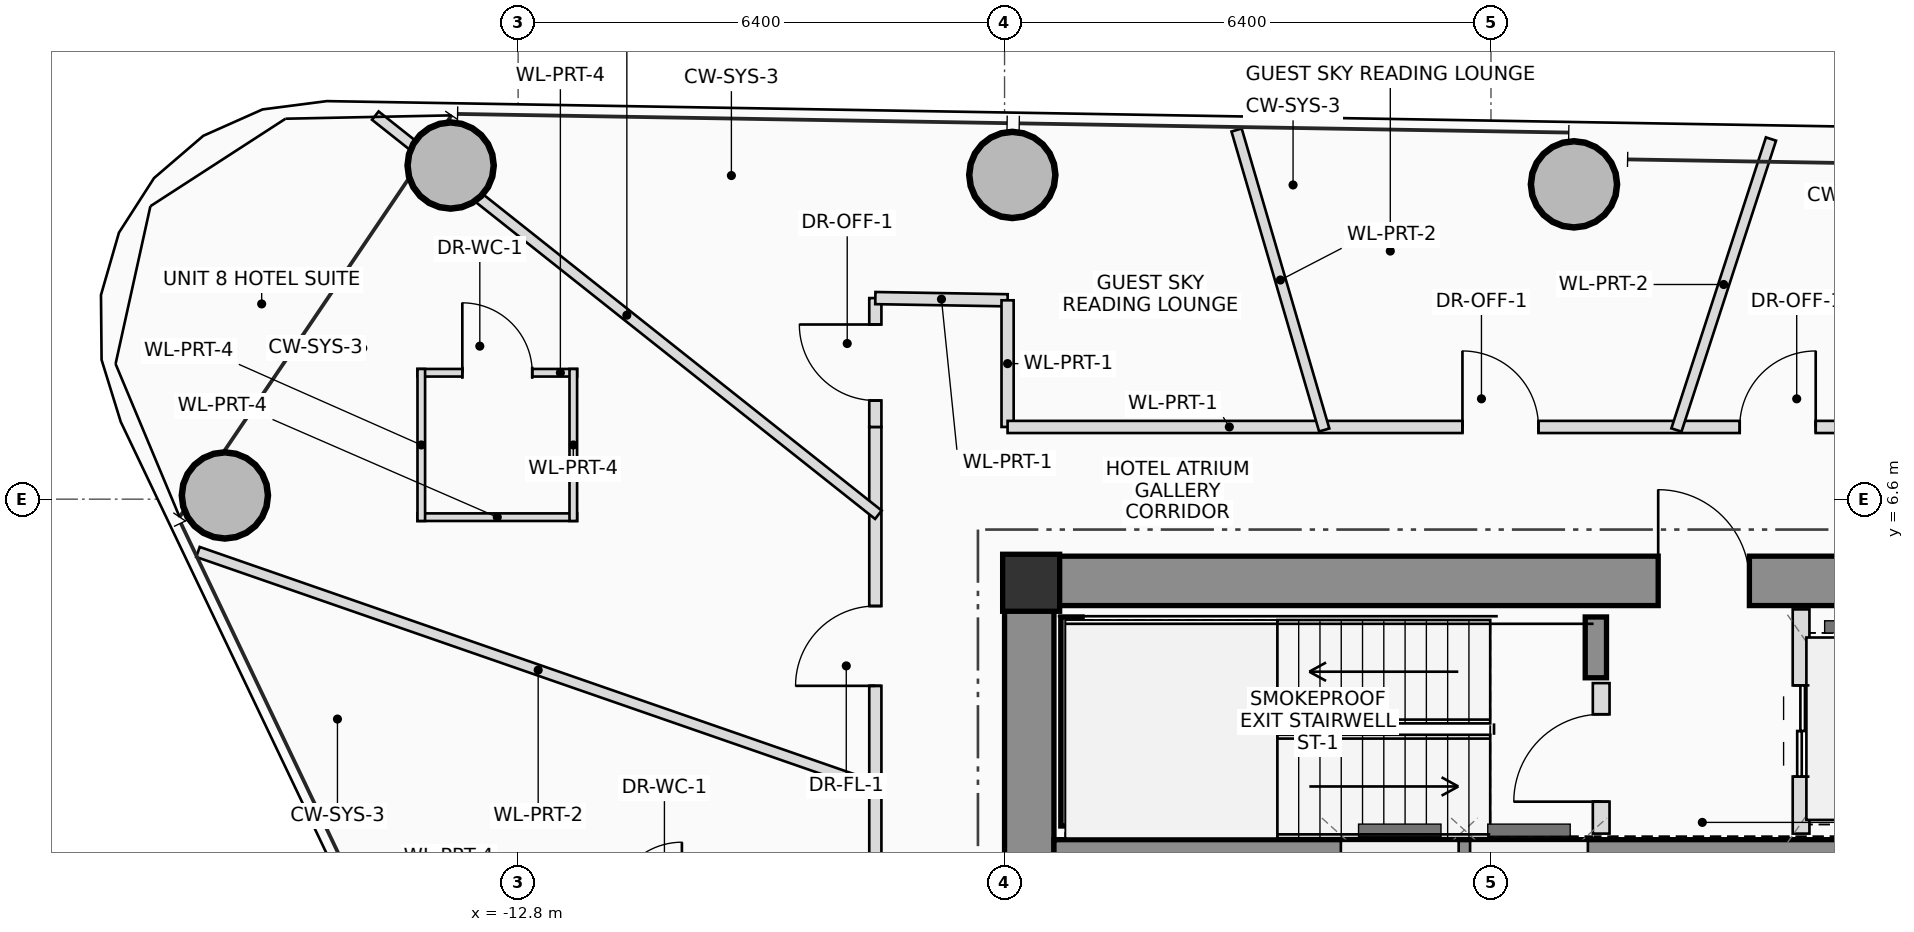
"""IFC4 building model, lengths in metres.
Left out: names, types, materials, properties, quantities, classifications, styles, units other than length and angle.
Written with IfcOpenShell. Run it as: python <this file> out.ifc"""

import sys

from ifc_helpers import new_model, si_unit, direction, frame, frame_2d, origin, origin_2d, place, context, subcontext, project, spatial, rectangle, hollow_circle, extrude, source, transform, mapped, element, fill, save


model = new_model("IFC4")
c1 = context("Model", 3, precision=1e-05, world=origin(), true_north=direction((0.0, 1.0)))
c2 = subcontext(c1, "Body", "Model", "MODEL_VIEW")
j1 = project(units=[si_unit("LENGTHUNIT", "METRE"), si_unit("PLANEANGLEUNIT", "RADIAN")], contexts=[c1])
p1 = place(None, origin())
s1 = spatial("IfcSite", under=j1, at=p1, CompositionType="ELEMENT")
p2 = place(p1, origin())
s2 = spatial("IfcBuilding", under=s1, at=p2, CompositionType="ELEMENT")
p3 = place(p2, frame((0.0, 0.0, 201.8)))
s3 = spatial("IfcBuildingStorey", under=s2, at=p3, CompositionType="ELEMENT", Elevation=201.8)
m1 = source(origin(), c2, "Body", "SweptSolid", [
    extrude(rectangle(XDim=0.75, YDim=0.75, at=origin_2d()), origin(), (0.0, 0.0, 1.0), 3.45),
])
p4 = place(p3, frame((-6.05, 5.5, 0.0), z_axis=(0.0, 0.0, 1.0), x_axis=(1.0, 0.0, 0.0)))
e1 = element("IfcColumn", 1, at=p4, inside=s3, PredefinedType="COLUMN", context=c2, shape_type="MappedRepresentation", body=[
    mapped(m1, transform((0.0, 0.0, 0.0), scale=1.0)),
])
p5 = place(p3, frame((-6.4, 5.525, 0.0), z_axis=(0.0, 0.0, 1.0), x_axis=(1.0, 0.0, 0.0)))
e2 = element("IfcWall", 2, at=p5, inside=s3, PredefinedType="SHEAR", context=c2, shape_type="SweptSolid", body=[
    extrude(rectangle(XDim=12.8, YDim=0.65, at=frame_2d((6.4, 0.0))), origin(), (0.0, 0.0, 1.0), 3.45),
])
p6 = place(p5, frame((8.6, 0.0, 0.0)))
e3 = element("IfcOpeningElement", 3, at=p6, cuts=e2, PredefinedType="OPENING", context=c2, shape_type="SweptSolid", body=[
    extrude(rectangle(XDim=1.2, YDim=2.2, at=frame_2d((0.6, 1.1))), frame((0.0, 0.335, 0.0), z_axis=(0.0, -1.0, 0.0), x_axis=(1.0, 0.0, 0.0)), (0.0, 0.0, 1.0), 0.67),
])
p7 = place(p3, frame((-6.075, 1.75, 0.0), z_axis=(0.0, 0.0, 1.0), x_axis=(0.0, 1.0, 0.0)))
e4 = element("IfcWall", 4, at=p7, inside=s3, PredefinedType="SHEAR", context=c2, shape_type="SweptSolid", body=[
    extrude(rectangle(XDim=3.45, YDim=0.65, at=frame_2d((1.725, 0.0))), origin(), (0.0, 0.0, 1.0), 3.45),
])
p8 = place(p3, frame((-5.75, 1.94, 0.0), z_axis=(0.0, 0.0, 1.0), x_axis=(1.0, 0.0, 0.0)))
e5 = element("IfcWall", 5, at=p8, inside=s3, PredefinedType="SHEAR", context=c2, shape_type="SweptSolid", body=[
    extrude(rectangle(XDim=11.5, YDim=0.36, at=frame_2d((5.75, 0.0))), origin(), (0.0, 0.0, 1.0), 3.45),
])
p9 = place(p3, frame((-5.52, 2.3, 0.0), z_axis=(0.0, 0.0, 1.0), x_axis=(0.0, 1.0, 0.0)))
e6 = element("IfcWall", 6, at=p9, inside=s3, PredefinedType="SHEAR", context=c2, shape_type="SweptSolid", body=[
    extrude(rectangle(XDim=2.75, YDim=0.28, at=frame_2d((1.375, 0.0))), origin(), (0.0, 0.0, 1.0), 3.45),
])
p10 = place(p3, frame((1.38, 4.25, 0.0), z_axis=(0.0, 0.0, 1.0), x_axis=(0.0, 1.0, 0.0)))
e7 = element("IfcWall", 7, at=p10, inside=s3, PredefinedType="SHEAR", context=c2, shape_type="SweptSolid", body=[
    extrude(rectangle(XDim=0.8, YDim=0.28, at=frame_2d((0.4, 0.0))), origin(), (0.0, 0.0, 1.0), 3.45),
])
m2 = source(origin(), c2, "Body", "SweptSolid", [
    extrude(hollow_circle(Radius=0.575, WallThickness=0.042, at=origin_2d()), origin(), (0.0, 0.0, 1.0), 3.45),
])
for number, where, z_axis, x_axis in (
    (8, (1.092, 10.742, 0.0), (0.0, 0.0, 1.0), (1.0, 0.0, 0.0)),
    (9, (-6.298, 10.865, 0.0), (0.0, 0.0, 1.0), (1.0, 0.0, 0.0)),
    (10, (-13.688, 10.99, 0.0), (0.0, 0.0, 1.0), (1.0, 0.0, 0.0)),
    (11, (-16.658, 6.649, 0.0), (0.0, 0.0, 1.0), (1.0, 0.0, 0.0)),
):
    element("IfcColumn", number, at=place(p3, frame(where, z_axis=z_axis, x_axis=x_axis)), inside=s3, PredefinedType="COLUMN", context=c2, shape_type="MappedRepresentation", body=[
        mapped(m2, transform((0.0, 0.0, 0.0), scale=1.0)),
    ])
p11 = place(p3, frame((1.45, 2.2, 0.0), z_axis=(0.0, 0.0, 1.0), x_axis=(0.0, 1.0, 0.0)))
e12 = element("IfcWall", 12, at=p11, inside=s3, PredefinedType="PLUMBINGWALL", context=c2, shape_type="SweptSolid", body=[
    extrude(rectangle(XDim=1.98, YDim=0.22, at=frame_2d((0.99, 0.0))), origin(), (0.0, 0.0, 1.0), 3.25),
])
p12 = place(p11, frame((0.42, 0.0, 0.0)))
e13 = element("IfcOpeningElement", 13, at=p12, cuts=e12, PredefinedType="OPENING", context=c2, shape_type="SweptSolid", body=[
    extrude(rectangle(XDim=1.15, YDim=2.15, at=frame_2d((0.575, 1.075))), frame((0.0, 0.12, 0.0), z_axis=(0.0, -1.0, 0.0), x_axis=(1.0, 0.0, 0.0)), (0.0, 0.0, 1.0), 0.24),
])
p13 = place(p3, frame((4.08, 2.2, 0.0), z_axis=(0.0, 0.0, 1.0), x_axis=(0.0, 1.0, 0.0)))
e14 = element("IfcWall", 14, at=p13, inside=s3, PredefinedType="PLUMBINGWALL", context=c2, shape_type="SweptSolid", body=[
    extrude(rectangle(XDim=2.95, YDim=0.22, at=frame_2d((1.475, 0.0))), origin(), (0.0, 0.0, 1.0), 3.25),
])
p14 = place(p13, frame((0.75, 0.0, 0.0)))
e15 = element("IfcOpeningElement", 15, at=p14, cuts=e14, PredefinedType="OPENING", context=c2, shape_type="SweptSolid", body=[
    extrude(rectangle(XDim=1.2, YDim=2.25, at=frame_2d((0.6, 1.125))), frame((0.0, 0.12, 0.0), z_axis=(0.0, -1.0, 0.0), x_axis=(1.0, 0.0, 0.0)), (0.0, 0.0, 1.0), 0.24),
])
p15 = place(p3, frame((-14.124, 8.263, 0.0), z_axis=(0.0, 0.0, 1.0), x_axis=(1.0, 0.0, 0.0)))
e16 = element("IfcWall", 16, at=p15, inside=s3, PredefinedType="PARTITIONING", context=c2, shape_type="SweptSolid", body=[
    extrude(rectangle(XDim=2.1, YDim=0.1, at=frame_2d((1.05, 0.0))), origin(), (0.0, 0.0, 1.0), 3.25),
])
p16 = place(p15, frame((0.59, 0.0, 0.0)))
e17 = element("IfcOpeningElement", 17, at=p16, cuts=e16, PredefinedType="OPENING", context=c2, shape_type="SweptSolid", body=[
    extrude(rectangle(XDim=0.92, YDim=2.1, at=frame_2d((0.46, 1.05))), frame((0.0, 0.06, 0.0), z_axis=(0.0, -1.0, 0.0), x_axis=(1.0, 0.0, 0.0)), (0.0, 0.0, 1.0), 0.12),
])
p17 = place(p3, frame((-12.024, 6.363, 0.0), z_axis=(0.0, 0.0, 1.0), x_axis=(-1.0, 0.0, 0.0)))
e18 = element("IfcWall", 18, at=p17, inside=s3, PredefinedType="PARTITIONING", context=c2, shape_type="SweptSolid", body=[
    extrude(rectangle(XDim=2.1, YDim=0.1, at=frame_2d((1.05, 0.0))), origin(), (0.0, 0.0, 1.0), 2.605),
])
p18 = place(p3, frame((-12.074, 8.313, 0.0), z_axis=(0.0, 0.0, 1.0), x_axis=(0.0, -1.0, 0.0)))
e19 = element("IfcWall", 19, at=p18, inside=s3, PredefinedType="PARTITIONING", context=c2, shape_type="SweptSolid", body=[
    extrude(rectangle(XDim=2.0, YDim=0.1, at=frame_2d((1.0, 0.0))), origin(), (0.0, 0.0, 1.0), 2.905),
])
p19 = place(p3, frame((-14.074, 6.313, 0.0), z_axis=(0.0, 0.0, 1.0), x_axis=(0.0, 1.0, 0.0)))
e20 = element("IfcWall", 20, at=p19, inside=s3, PredefinedType="PARTITIONING", context=c2, shape_type="SweptSolid", body=[
    extrude(rectangle(XDim=2.0, YDim=0.1, at=frame_2d((1.0, 0.0))), origin(), (0.0, 0.0, 1.0), 2.605),
])
p20 = place(p3, frame((-8.1, -7.46, 0.0), z_axis=(0.0, 0.0, 1.0), x_axis=(0.0, 1.0, 0.0)))
e21 = element("IfcWall", 21, at=p20, inside=s3, PredefinedType="PARTITIONING", context=c2, shape_type="SweptSolid", body=[
    extrude(rectangle(XDim=15.01, YDim=0.16, at=frame_2d((7.505, 0.0))), origin(), (0.0, 0.0, 1.0), 2.605),
])
p21 = place(p20, frame((1.537, 0.0, 0.0)))
e22 = element("IfcOpeningElement", 22, at=p21, cuts=e21, PredefinedType="OPENING", context=c2, shape_type="SweptSolid", body=[
    extrude(rectangle(XDim=0.9, YDim=2.05, at=frame_2d((0.45, 1.025))), frame((0.0, 0.09, 0.0), z_axis=(0.0, -1.0, 0.0), x_axis=(1.0, 0.0, 0.0)), (0.0, 0.0, 1.0), 0.18),
])
p22 = place(p20, frame((6.522, 0.0, 0.0)))
e23 = element("IfcOpeningElement", 23, at=p22, cuts=e21, PredefinedType="OPENING", context=c2, shape_type="SweptSolid", body=[
    extrude(rectangle(XDim=1.05, YDim=2.2, at=frame_2d((0.525, 1.1))), frame((0.0, 0.09, 0.0), z_axis=(0.0, -1.0, 0.0), x_axis=(1.0, 0.0, 0.0)), (0.0, 0.0, 1.0), 0.18),
])
p23 = place(p20, frame((11.604, 0.0, 0.0)))
e24 = element("IfcOpeningElement", 24, at=p23, cuts=e21, PredefinedType="OPENING", context=c2, shape_type="SweptSolid", body=[
    extrude(rectangle(XDim=1.05, YDim=2.2, at=frame_2d((0.525, 1.1))), frame((0.0, 0.09, 0.0), z_axis=(0.0, -1.0, 0.0), x_axis=(1.0, 0.0, 0.0)), (0.0, 0.0, 1.0), 0.18),
])
p24 = place(p3, frame((-8.1, 7.55, 0.0), z_axis=(0.0, 0.0, 1.0), x_axis=(0.0, 1.0, 0.0)))
e25 = element("IfcWall", 25, at=p24, inside=s3, PredefinedType="PARTITIONING", context=c2, shape_type="SweptSolid", body=[
    extrude(rectangle(XDim=1.696, YDim=0.16, at=frame_2d((0.848, 0.0))), origin(), (0.0, 0.0, 1.0), 2.805),
])
p25 = place(p24, frame((0.348, 0.0, 0.0)))
e26 = element("IfcOpeningElement", 26, at=p25, cuts=e25, PredefinedType="OPENING", context=c2, shape_type="SweptSolid", body=[
    extrude(rectangle(XDim=1.0, YDim=2.25, at=frame_2d((0.5, 1.125))), frame((0.0, 0.09, 0.0), z_axis=(0.0, -1.0, 0.0), x_axis=(1.0, 0.0, 0.0)), (0.0, 0.0, 1.0), 0.18),
])
p26 = place(p3, frame((-8.1, 9.246, 0.0), z_axis=(0.0, 0.0, 1.0), x_axis=(0.999858281466, -0.016834992813, 0.0)))
e27 = element("IfcWall", 27, at=p26, inside=s3, PredefinedType="PARTITIONING", context=c2, shape_type="SweptSolid", body=[
    extrude(rectangle(XDim=1.74, YDim=0.16, at=frame_2d((0.87, 0.0))), origin(), (0.0, 0.0, 1.0), 2.905),
])
p27 = place(p3, frame((-6.36, 9.216, 0.0), z_axis=(0.0, 0.0, 1.0), x_axis=(0.0, -1.0, 0.0)))
e28 = element("IfcWall", 28, at=p27, inside=s3, PredefinedType="PARTITIONING", context=c2, shape_type="SweptSolid", body=[
    extrude(rectangle(XDim=1.666, YDim=0.16, at=frame_2d((0.833, 0.0))), origin(), (0.0, 0.0, 1.0), 2.605),
])
p28 = place(p3, frame((-6.36, 7.55, 0.0), z_axis=(0.0, 0.0, 1.0), x_axis=(1.0, 0.0, 0.0)))
e29 = element("IfcWall", 29, at=p28, inside=s3, PredefinedType="PARTITIONING", context=c2, shape_type="SweptSolid", body=[
    extrude(rectangle(XDim=11.61, YDim=0.16, at=frame_2d((5.805, 0.0))), origin(), (0.0, 0.0, 1.0), 2.605),
])
p29 = place(p28, frame((5.985, 0.0, 0.0)))
e30 = element("IfcOpeningElement", 30, at=p29, cuts=e29, PredefinedType="OPENING", context=c2, shape_type="SweptSolid", body=[
    extrude(rectangle(XDim=1.0, YDim=2.25, at=frame_2d((0.5, 1.125))), frame((0.0, 0.09, 0.0), z_axis=(0.0, -1.0, 0.0), x_axis=(1.0, 0.0, 0.0)), (0.0, 0.0, 1.0), 0.18),
])
p30 = place(p28, frame((9.633, 0.0, 0.0)))
e31 = element("IfcOpeningElement", 31, at=p30, cuts=e29, PredefinedType="OPENING", context=c2, shape_type="SweptSolid", body=[
    extrude(rectangle(XDim=1.0, YDim=2.25, at=frame_2d((0.5, 1.125))), frame((0.0, 0.09, 0.0), z_axis=(0.0, -1.0, 0.0), x_axis=(1.0, 0.0, 0.0)), (0.0, 0.0, 1.0), 0.18),
])
p31 = place(p3, frame((2.44, 7.51, 0.0), z_axis=(0.0, 0.0, 1.0), x_axis=(0.309013387048, 0.951057688379, 0.0)))
e32 = element("IfcWall", 32, at=p31, inside=s3, PredefinedType="PARTITIONING", context=c2, shape_type="SweptSolid", body=[
    extrude(rectangle(XDim=4.025, YDim=0.14, at=frame_2d((2.013, 0.0))), origin(), (0.0, 0.0, 1.0), 2.605),
])
p32 = place(p3, frame((-2.194, 7.51, 0.0), z_axis=(0.0, 0.0, 1.0), x_axis=(-0.280410435425, 0.959880194454, 0.0)))
e33 = element("IfcWall", 33, at=p32, inside=s3, PredefinedType="PARTITIONING", context=c2, shape_type="SweptSolid", body=[
    extrude(rectangle(XDim=4.111, YDim=0.14, at=frame_2d((2.056, 0.0))), origin(), (0.0, 0.0, 1.0), 2.765),
])
p33 = place(p3, frame((-8.06, 6.395, 0.0), z_axis=(0.0, 0.0, 1.0), x_axis=(-0.783385602556, 0.621535998723, 0.0)))
e34 = element("IfcWall", 34, at=p33, inside=s3, PredefinedType="PARTITIONING", context=c2, shape_type="SweptSolid", body=[
    extrude(rectangle(XDim=8.449, YDim=0.14, at=frame_2d((4.224, 0.0))), origin(), (0.0, 0.0, 1.0), 2.605),
])
p34 = place(p3, frame((-8.06, 2.798, 0.0), z_axis=(0.0, 0.0, 1.0), x_axis=(-0.944705149401, 0.327920997643, 0.0)))
e35 = element("IfcWall", 35, at=p34, inside=s3, PredefinedType="PARTITIONING", context=c2, shape_type="SweptSolid", body=[
    extrude(rectangle(XDim=9.476, YDim=0.14, at=frame_2d((4.738, 0.0))), origin(), (0.0, 0.0, 1.0), 2.605),
])
p35 = place(p6, origin())
e36 = element("IfcDoor", 36, at=p35, inside=s3, OperationType="SINGLE_SWING_LEFT", PredefinedType="DOOR", context=c2, shape_type="SweptSolid", body=[
    extrude(rectangle(XDim=1.2, YDim=2.2, at=frame_2d((0.6, 1.1))), frame((0.0, 0.025, 0.0), z_axis=(0.0, -1.0, 0.0), x_axis=(1.0, 0.0, 0.0)), (0.0, 0.0, 1.0), 0.05),
])
fill(e3, e36)
p36 = place(p12, origin())
e37 = element("IfcDoor", 37, at=p36, inside=s3, OperationType="SINGLE_SWING_LEFT", PredefinedType="DOOR", context=c2, shape_type="SweptSolid", body=[
    extrude(rectangle(XDim=1.15, YDim=2.15, at=frame_2d((0.575, 1.075))), frame((0.0, 0.025, 0.0), z_axis=(0.0, -1.0, 0.0), x_axis=(1.0, 0.0, 0.0)), (0.0, 0.0, 1.0), 0.05),
])
fill(e13, e37)
p37 = place(p14, origin())
e38 = element("IfcDoor", 38, at=p37, inside=s3, OperationType="DOUBLE_DOOR_SLIDING", PredefinedType="DOOR", context=c2, shape_type="SweptSolid", body=[
    extrude(rectangle(XDim=1.2, YDim=2.25, at=frame_2d((0.6, 1.125))), frame((0.0, 0.025, 0.0), z_axis=(0.0, -1.0, 0.0), x_axis=(1.0, 0.0, 0.0)), (0.0, 0.0, 1.0), 0.05),
])
fill(e15, e38)
p38 = place(p16, origin())
e39 = element("IfcDoor", 39, at=p38, inside=s3, OperationType="SINGLE_SWING_LEFT", PredefinedType="DOOR", context=c2, shape_type="SweptSolid", body=[
    extrude(rectangle(XDim=0.92, YDim=2.1, at=frame_2d((0.46, 1.05))), frame((0.0, 0.025, 0.0), z_axis=(0.0, -1.0, 0.0), x_axis=(1.0, 0.0, 0.0)), (0.0, 0.0, 1.0), 0.05),
])
fill(e17, e39)
p39 = place(p23, origin())
e40 = element("IfcDoor", 40, at=p39, inside=s3, OperationType="SINGLE_SWING_LEFT", PredefinedType="DOOR", context=c2, shape_type="SweptSolid", body=[
    extrude(rectangle(XDim=1.05, YDim=2.2, at=frame_2d((0.525, 1.1))), frame((0.0, 0.025, 0.0), z_axis=(0.0, -1.0, 0.0), x_axis=(1.0, 0.0, 0.0)), (0.0, 0.0, 1.0), 0.05),
])
fill(e24, e40)
p40 = place(p25, origin())
e41 = element("IfcDoor", 41, at=p40, inside=s3, OperationType="SINGLE_SWING_RIGHT", PredefinedType="DOOR", context=c2, shape_type="SweptSolid", body=[
    extrude(rectangle(XDim=1.0, YDim=2.25, at=frame_2d((0.5, 1.125))), frame((0.0, 0.025, 0.0), z_axis=(0.0, -1.0, 0.0), x_axis=(1.0, 0.0, 0.0)), (0.0, 0.0, 1.0), 0.05),
])
fill(e26, e41)
p41 = place(p29, origin())
e42 = element("IfcDoor", 42, at=p41, inside=s3, OperationType="SINGLE_SWING_LEFT", PredefinedType="DOOR", context=c2, shape_type="SweptSolid", body=[
    extrude(rectangle(XDim=1.0, YDim=2.25, at=frame_2d((0.5, 1.125))), frame((0.0, 0.025, 0.0), z_axis=(0.0, -1.0, 0.0), x_axis=(1.0, 0.0, 0.0)), (0.0, 0.0, 1.0), 0.05),
])
fill(e30, e42)
p42 = place(p30, origin())
e43 = element("IfcDoor", 43, at=p42, inside=s3, OperationType="SINGLE_SWING_RIGHT", PredefinedType="DOOR", context=c2, shape_type="SweptSolid", body=[
    extrude(rectangle(XDim=1.0, YDim=2.25, at=frame_2d((0.5, 1.125))), frame((0.0, 0.025, 0.0), z_axis=(0.0, -1.0, 0.0), x_axis=(1.0, 0.0, 0.0)), (0.0, 0.0, 1.0), 0.05),
])
fill(e31, e43)
save(model, sys.argv[1])
